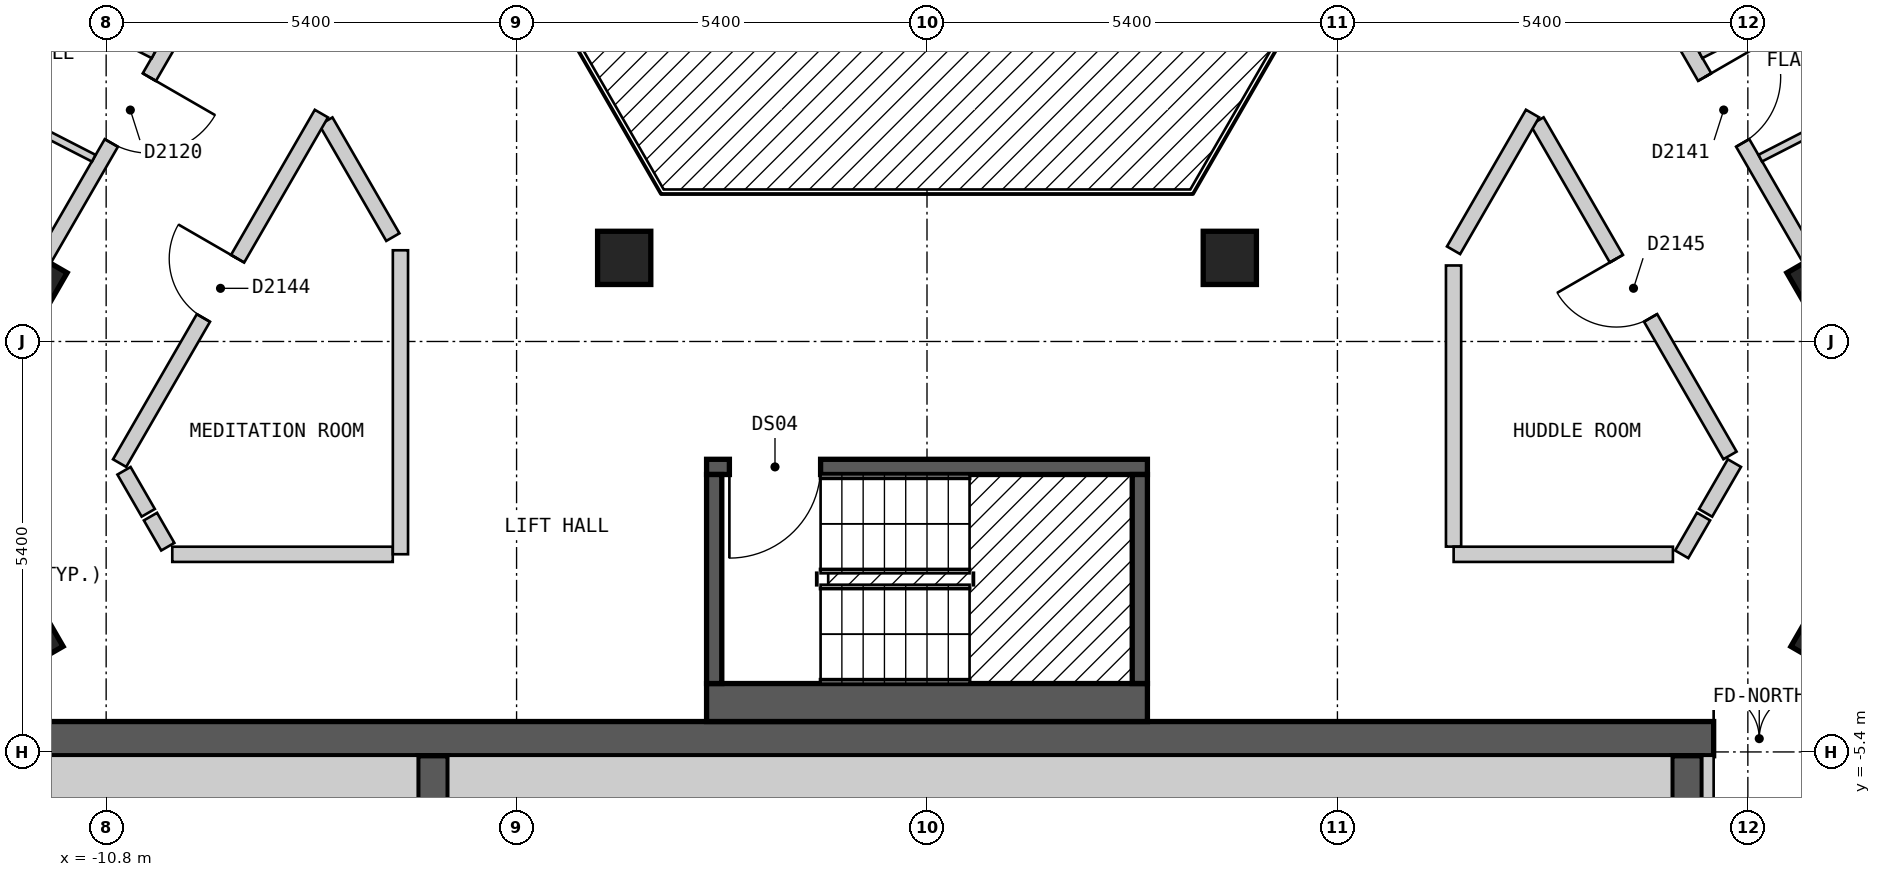
"""IFC4 building model, lengths in metres.
Left out: names, types, materials, properties, quantities, classifications, styles, units other than length and angle.
Written with IfcOpenShell. Run it as: python <this file> out.ifc"""

import sys

from ifc_helpers import new_model, si_unit, direction, frame, frame_2d, origin, origin_2d, place, context, subcontext, project, spatial, rectangle, extrude, element, fill, save


model = new_model("IFC4")
c1 = context("Model", 3, precision=1e-05, world=origin(), true_north=direction((0.0, 1.0)))
c2 = subcontext(c1, "Body", "Model", "MODEL_VIEW")
j1 = project(units=[si_unit("LENGTHUNIT", "METRE"), si_unit("PLANEANGLEUNIT", "RADIAN")], contexts=[c1])
p1 = place(None, origin())
s1 = spatial("IfcSite", under=j1, at=p1, CompositionType="ELEMENT")
p2 = place(p1, origin())
s2 = spatial("IfcBuilding", under=s1, at=p2, CompositionType="ELEMENT")
p3 = place(p2, frame((0.0, 0.0, 211.8)))
s3 = spatial("IfcBuildingStorey", under=s2, at=p3, CompositionType="ELEMENT", Elevation=211.8)
for number, where, z_axis, x_axis in (
    (1, (-11.845, -3.883, 0.0), (0.0, 0.0, 1.0), (0.5, -0.866, 0.0)),
    (2, (11.845, -3.884, 0.0), (0.0, 0.0, 1.0), (0.5, 0.866, 0.0)),
    (3, (11.792, 0.775, 0.0), (0.0, 0.0, 1.0), (-0.5, 0.866, 0.0)),
    (4, (3.984, 1.1, 0.0), (0.0, 0.0, 1.0), (1.0, 0.0, 0.0)),
    (5, (-3.984, 1.1, 0.0), (0.0, 0.0, 1.0), (1.0, 0.0, 0.0)),
    (6, (-11.792, 0.775, 0.0), (0.0, 0.0, 1.0), (-0.5, -0.866, 0.0)),
):
    element("IfcColumn", number, at=place(p3, frame(where, z_axis=z_axis, x_axis=x_axis)), inside=s3, PredefinedType="COLUMN", context=c2, shape_type="SweptSolid", body=[
        extrude(rectangle(XDim=0.7, YDim=0.7, at=origin_2d()), origin(), (0.0, 0.0, 1.0), 3.0),
    ])
p4 = place(p3, frame((-13.3, -5.225, 0.0), z_axis=(0.0, 0.0, 1.0), x_axis=(1.0, 0.0, 0.0)))
e7 = element("IfcWall", 7, at=p4, inside=s3, PredefinedType="SHEAR", context=c2, shape_type="SweptSolid", body=[
    extrude(rectangle(XDim=26.6, YDim=0.45, at=frame_2d((13.3, 0.0))), origin(), (0.0, 0.0, 1.0), 2.7),
])
p5 = place(p4, frame((23.65, 0.0, 0.0)))
e8 = element("IfcOpeningElement", 8, at=p5, cuts=e7, PredefinedType="OPENING", context=c2, shape_type="SweptSolid", body=[
    extrude(rectangle(XDim=1.2, YDim=2.1, at=frame_2d((0.6, 1.05))), frame((0.0, 0.235, 0.0), z_axis=(0.0, -1.0, 0.0), x_axis=(1.0, 0.0, 0.0)), (0.0, 0.0, 1.0), 0.47),
])
for number, where, z_axis, x_axis in (
    (9, (-6.5, -9.15, 0.0), (0.0, 0.0, 1.0), (0.0, 1.0, 0.0)),
    (10, (10.0, -9.15, 0.0), (0.0, 0.0, 1.0), (0.0, 1.0, 0.0)),
):
    element("IfcWall", number, at=place(p3, frame(where, z_axis=z_axis, x_axis=x_axis)), inside=s3, PredefinedType="SHEAR", context=c2, shape_type="SweptSolid", body=[
        extrude(rectangle(XDim=3.7, YDim=0.4, at=frame_2d((1.85, 0.0))), origin(), (0.0, 0.0, 1.0), 2.7),
    ])
p6 = place(p3, frame((-2.9, -4.75, 0.0), z_axis=(0.0, 0.0, 1.0), x_axis=(1.0, 0.0, 0.0)))
e11 = element("IfcWall", 11, at=p6, inside=s3, PredefinedType="SOLIDWALL", context=c2, shape_type="SweptSolid", body=[
    extrude(rectangle(XDim=5.8, YDim=0.5, at=frame_2d((2.9, 0.0))), origin(), (0.0, 0.0, 1.0), 2.7),
])
p7 = place(p3, frame((-2.9, -1.65, 0.0), z_axis=(0.0, 0.0, 1.0), x_axis=(1.0, 0.0, 0.0)))
e12 = element("IfcWall", 12, at=p7, inside=s3, PredefinedType="SOLIDWALL", context=c2, shape_type="SweptSolid", body=[
    extrude(rectangle(XDim=5.8, YDim=0.2, at=frame_2d((2.9, 0.0))), origin(), (0.0, 0.0, 1.0), 2.7),
])
p8 = place(p7, frame((0.3, 0.0, 0.0)))
e13 = element("IfcOpeningElement", 13, at=p8, cuts=e12, PredefinedType="OPENING", context=c2, shape_type="SweptSolid", body=[
    extrude(rectangle(XDim=1.2, YDim=2.1, at=frame_2d((0.6, 1.05))), frame((0.0, 0.11, 0.0), z_axis=(0.0, -1.0, 0.0), x_axis=(1.0, 0.0, 0.0)), (0.0, 0.0, 1.0), 0.22),
])
for number, where, z_axis, x_axis in (
    (14, (-2.8, -4.5, 0.0), (0.0, 0.0, 1.0), (0.0, 1.0, 0.0)),
    (15, (2.8, -4.5, 0.0), (0.0, 0.0, 1.0), (0.0, 1.0, 0.0)),
):
    element("IfcWall", number, at=place(p3, frame(where, z_axis=z_axis, x_axis=x_axis)), inside=s3, PredefinedType="SOLIDWALL", context=c2, shape_type="SweptSolid", body=[
        extrude(rectangle(XDim=2.75, YDim=0.2, at=frame_2d((1.375, 0.0))), origin(), (0.0, 0.0, 1.0), 2.7),
    ])
p9 = place(p3, frame((-7.909, 2.898, 0.0), z_axis=(0.0, 0.0, 1.0), x_axis=(0.50019444547, -0.865913111531, 0.0)))
e16 = element("IfcWall", 16, at=p9, inside=s3, PredefinedType="PARTITIONING", context=c2, shape_type="SweptSolid", body=[
    extrude(rectangle(XDim=1.761, YDim=0.2, at=frame_2d((0.88, 0.0))), origin(), (0.0, 0.0, 1.0), 2.7),
])
p10 = place(p3, frame((-10.565, -1.701, 0.0), z_axis=(0.0, 0.0, 1.0), x_axis=(0.499512735409, -0.866306543416, 0.0)))
e17 = element("IfcWall", 17, at=p10, inside=s3, PredefinedType="PARTITIONING", context=c2, shape_type="SweptSolid", body=[
    extrude(rectangle(XDim=0.638, YDim=0.2, at=frame_2d((0.319, 0.0))), origin(), (0.0, 0.0, 1.0), 2.7),
])
p11 = place(p3, frame((-10.217, -2.304, 0.0), z_axis=(0.0, 0.0, 1.0), x_axis=(0.499013081552, -0.866594452117, 0.0)))
e18 = element("IfcWall", 18, at=p11, inside=s3, PredefinedType="PARTITIONING", context=c2, shape_type="SweptSolid", body=[
    extrude(rectangle(XDim=0.457, YDim=0.2, at=frame_2d((0.229, 0.0))), origin(), (0.0, 0.0, 1.0), 2.7),
])
p12 = place(p3, frame((8.026, 2.899, 0.0), z_axis=(0.0, 0.0, 1.0), x_axis=(0.499986018985, -0.866033475577, 0.0)))
e19 = element("IfcWall", 19, at=p12, inside=s3, PredefinedType="PARTITIONING", context=c2, shape_type="SweptSolid", body=[
    extrude(rectangle(XDim=5.078, YDim=0.2, at=frame_2d((2.539, 0.0))), origin(), (0.0, 0.0, 1.0), 2.7),
])
p13 = place(p12, frame((2.089, 0.0, 0.0)))
e20 = element("IfcOpeningElement", 20, at=p13, cuts=e19, PredefinedType="OPENING", context=c2, shape_type="SweptSolid", body=[
    extrude(rectangle(XDim=0.9, YDim=2.1, at=frame_2d((0.45, 1.05))), frame((0.0, 0.11, 0.0), z_axis=(0.0, -1.0, 0.0), x_axis=(1.0, 0.0, 0.0)), (0.0, 0.0, 1.0), 0.22),
])
p14 = place(p3, frame((9.238, 5.2, 0.0), z_axis=(0.0, 0.0, 1.0), x_axis=(0.500025705601, -0.86601056214, 0.0)))
e21 = element("IfcWall", 21, at=p14, inside=s3, PredefinedType="PARTITIONING", context=c2, shape_type="SweptSolid", body=[
    extrude(rectangle(XDim=7.735, YDim=0.2, at=frame_2d((3.868, 0.0))), origin(), (0.0, 0.0, 1.0), 2.7),
])
p15 = place(p14, frame((6.705, 0.0, 0.0)))
e22 = element("IfcOpeningElement", 22, at=p15, cuts=e21, PredefinedType="OPENING", context=c2, shape_type="SweptSolid", body=[
    extrude(rectangle(XDim=1.0, YDim=2.1, at=frame_2d((0.5, 1.05))), frame((0.0, 0.11, 0.0), z_axis=(0.0, -1.0, 0.0), x_axis=(1.0, 0.0, 0.0)), (0.0, 0.0, 1.0), 0.22),
])
p16 = place(p14, frame((1.988, 0.0, 0.0)))
e23 = element("IfcOpeningElement", 23, at=p16, cuts=e21, PredefinedType="OPENING", context=c2, shape_type="SweptSolid", body=[
    extrude(rectangle(XDim=1.0, YDim=2.1, at=frame_2d((0.5, 1.05))), frame((0.0, 0.11, 0.0), z_axis=(0.0, -1.0, 0.0), x_axis=(1.0, 0.0, 0.0)), (0.0, 0.0, 1.0), 0.22),
])
p17 = place(p3, frame((6.928, 1.0, 0.0), z_axis=(0.0, 0.0, 1.0), x_axis=(0.0, -1.0, 0.0)))
e24 = element("IfcWall", 24, at=p17, inside=s3, PredefinedType="PARTITIONING", context=c2, shape_type="SweptSolid", body=[
    extrude(rectangle(XDim=3.699, YDim=0.2, at=frame_2d((1.85, 0.0))), origin(), (0.0, 0.0, 1.0), 2.7),
])
p18 = place(p3, frame((-9.93, -2.8, 0.0), z_axis=(0.0, 0.0, 1.0), x_axis=(1.0, 0.0, 0.0)))
e25 = element("IfcWall", 25, at=p18, inside=s3, PredefinedType="PARTITIONING", context=c2, shape_type="SweptSolid", body=[
    extrude(rectangle(XDim=2.901, YDim=0.2, at=frame_2d((1.45, 0.0))), origin(), (0.0, 0.0, 1.0), 2.7),
])
p19 = place(p3, frame((6.929, -2.8, 0.0), z_axis=(0.0, 0.0, 1.0), x_axis=(1.0, 0.0, 0.0)))
e26 = element("IfcWall", 26, at=p19, inside=s3, PredefinedType="PARTITIONING", context=c2, shape_type="SweptSolid", body=[
    extrude(rectangle(XDim=2.885, YDim=0.2, at=frame_2d((1.442, 0.0))), origin(), (0.0, 0.0, 1.0), 2.7),
])
p20 = place(p3, frame((6.928, 1.2, 0.0), z_axis=(0.0, 0.0, 1.0), x_axis=(0.500132712588, 0.865948768577, 0.0)))
e27 = element("IfcWall", 27, at=p20, inside=s3, PredefinedType="PARTITIONING", context=c2, shape_type="SweptSolid", body=[
    extrude(rectangle(XDim=2.078, YDim=0.2, at=frame_2d((1.039, 0.0))), origin(), (0.0, 0.0, 1.0), 2.7),
])
p21 = place(p3, frame((9.93, -2.8, 0.0), z_axis=(0.0, 0.0, 1.0), x_axis=(0.500164219654, 0.865930570761, 0.0)))
e28 = element("IfcWall", 28, at=p21, inside=s3, PredefinedType="PARTITIONING", context=c2, shape_type="SweptSolid", body=[
    extrude(rectangle(XDim=0.574, YDim=0.2, at=frame_2d((0.287, 0.0))), origin(), (0.0, 0.0, 1.0), 2.7),
])
p22 = place(p3, frame((10.244, -2.255, 0.0), z_axis=(0.0, 0.0, 1.0), x_axis=(0.50109986513, 0.865389464442, 0.0)))
e29 = element("IfcWall", 29, at=p22, inside=s3, PredefinedType="PARTITIONING", context=c2, shape_type="SweptSolid", body=[
    extrude(rectangle(XDim=0.757, YDim=0.2, at=frame_2d((0.378, 0.0))), origin(), (0.0, 0.0, 1.0), 2.7),
])
p23 = place(p3, frame((-10.623, -1.6, 0.0), z_axis=(0.0, 0.0, 1.0), x_axis=(0.500040865889, 0.866001808567, 0.0)))
e30 = element("IfcWall", 30, at=p23, inside=s3, PredefinedType="PARTITIONING", context=c2, shape_type="SweptSolid", body=[
    extrude(rectangle(XDim=5.31, YDim=0.2, at=frame_2d((2.655, 0.0))), origin(), (0.0, 0.0, 1.0), 2.7),
])
p24 = place(p23, frame((2.205, 0.0, 0.0)))
e31 = element("IfcOpeningElement", 31, at=p24, cuts=e30, PredefinedType="OPENING", context=c2, shape_type="SweptSolid", body=[
    extrude(rectangle(XDim=0.9, YDim=2.1, at=frame_2d((0.45, 1.05))), frame((0.0, 0.11, 0.0), z_axis=(0.0, -1.0, 0.0), x_axis=(1.0, 0.0, 0.0)), (0.0, 0.0, 1.0), 0.22),
])
p25 = place(p3, frame((-13.106, -1.5, 0.0), z_axis=(0.0, 0.0, 1.0), x_axis=(0.500025705601, 0.86601056214, 0.0)))
e32 = element("IfcWall", 32, at=p25, inside=s3, PredefinedType="PARTITIONING", context=c2, shape_type="SweptSolid", body=[
    extrude(rectangle(XDim=7.735, YDim=0.2, at=frame_2d((3.868, 0.0))), origin(), (0.0, 0.0, 1.0), 2.7),
])
p26 = place(p25, frame((4.748, 0.0, 0.0)))
e33 = element("IfcOpeningElement", 33, at=p26, cuts=e32, PredefinedType="OPENING", context=c2, shape_type="SweptSolid", body=[
    extrude(rectangle(XDim=1.0, YDim=2.1, at=frame_2d((0.5, 1.05))), frame((0.0, 0.11, 0.0), z_axis=(0.0, -1.0, 0.0), x_axis=(1.0, 0.0, 0.0)), (0.0, 0.0, 1.0), 0.22),
])
p27 = place(p3, frame((-6.928, -2.799, 0.0), z_axis=(0.0, 0.0, 1.0), x_axis=(0.0, 1.0, 0.0)))
e34 = element("IfcWall", 34, at=p27, inside=s3, PredefinedType="PARTITIONING", context=c2, shape_type="SweptSolid", body=[
    extrude(rectangle(XDim=3.999, YDim=0.2, at=frame_2d((2.0, 0.0))), origin(), (0.0, 0.0, 1.0), 2.7),
])
p28 = place(p3, frame((-12.917, 5.177, 0.0), z_axis=(0.0, 0.0, 1.0), x_axis=(0.889829844516, -0.456292502467, 0.0)))
e35 = element("IfcWall", 35, at=p28, inside=s3, PredefinedType="PARTITIONING", context=c2, shape_type="SweptSolid", body=[
    extrude(rectangle(XDim=3.079, YDim=0.1, at=frame_2d((1.54, 0.0))), origin(), (0.0, 0.0, 1.0), 2.7),
])
p29 = place(p28, frame((1.114, 0.0, 0.0)))
e36 = element("IfcOpeningElement", 36, at=p29, cuts=e35, PredefinedType="OPENING", context=c2, shape_type="SweptSolid", body=[
    extrude(rectangle(XDim=0.9, YDim=2.1, at=frame_2d((0.45, 1.05))), frame((0.0, 0.06, 0.0), z_axis=(0.0, -1.0, 0.0), x_axis=(1.0, 0.0, 0.0)), (0.0, 0.0, 1.0), 0.12),
])
p30 = place(p3, frame((-13.634, 3.78, 0.0), z_axis=(0.0, 0.0, 1.0), x_axis=(0.889908901513, -0.456138298116, 0.0)))
e37 = element("IfcWall", 37, at=p30, inside=s3, PredefinedType="PARTITIONING", context=c2, shape_type="SweptSolid", body=[
    extrude(rectangle(XDim=3.002, YDim=0.1, at=frame_2d((1.501, 0.0))), origin(), (0.0, 0.0, 1.0), 2.7),
])
p31 = place(p30, frame((1.126, 0.0, 0.0)))
e38 = element("IfcOpeningElement", 38, at=p31, cuts=e37, PredefinedType="OPENING", context=c2, shape_type="SweptSolid", body=[
    extrude(rectangle(XDim=0.8, YDim=2.1, at=frame_2d((0.4, 1.05))), frame((0.0, 0.06, 0.0), z_axis=(0.0, -1.0, 0.0), x_axis=(1.0, 0.0, 0.0)), (0.0, 0.0, 1.0), 0.12),
])
p32 = place(p3, frame((10.178, 3.772, 0.0), z_axis=(0.0, 0.0, 1.0), x_axis=(0.889732071959, 0.456483121405, 0.0)))
e39 = element("IfcWall", 39, at=p32, inside=s3, PredefinedType="PARTITIONING", context=c2, shape_type="SweptSolid", body=[
    extrude(rectangle(XDim=2.679, YDim=0.1, at=frame_2d((1.34, 0.0))), origin(), (0.0, 0.0, 1.0), 2.7),
])
p33 = place(p32, frame((0.915, 0.0, 0.0)))
e40 = element("IfcOpeningElement", 40, at=p33, cuts=e39, PredefinedType="OPENING", context=c2, shape_type="SweptSolid", body=[
    extrude(rectangle(XDim=0.8, YDim=2.1, at=frame_2d((0.4, 1.05))), frame((0.0, 0.06, 0.0), z_axis=(0.0, -1.0, 0.0), x_axis=(1.0, 0.0, 0.0)), (0.0, 0.0, 1.0), 0.12),
])
p34 = place(p3, frame((10.963, 2.412, 0.0), z_axis=(0.0, 0.0, 1.0), x_axis=(0.889943997558, 0.456069820543, 0.0)))
e41 = element("IfcWall", 41, at=p34, inside=s3, PredefinedType="PARTITIONING", context=c2, shape_type="SweptSolid", body=[
    extrude(rectangle(XDim=2.651, YDim=0.1, at=frame_2d((1.325, 0.0))), origin(), (0.0, 0.0, 1.0), 2.7),
])
p35 = place(p34, frame((0.826, 0.0, 0.0)))
e42 = element("IfcOpeningElement", 42, at=p35, cuts=e41, PredefinedType="OPENING", context=c2, shape_type="SweptSolid", body=[
    extrude(rectangle(XDim=0.9, YDim=2.1, at=frame_2d((0.45, 1.05))), frame((0.0, 0.06, 0.0), z_axis=(0.0, -1.0, 0.0), x_axis=(1.0, 0.0, 0.0)), (0.0, 0.0, 1.0), 0.12),
])
p36 = place(p3, frame((-12.1, -5.825, 0.0), z_axis=(0.0, 0.0, 1.0), x_axis=(1.0, 0.0, 0.0)))
e43 = element("IfcWall", 43, at=p36, inside=s3, PredefinedType="SOLIDWALL", context=c2, shape_type="SweptSolid", body=[
    extrude(rectangle(XDim=5.4, YDim=0.75, at=frame_2d((2.7, 0.0))), origin(), (0.0, 0.0, 1.0), 2.7),
])
p37 = place(p3, frame((-6.3, -5.825, 0.0), z_axis=(0.0, 0.0, 1.0), x_axis=(1.0, 0.0, 0.0)))
e44 = element("IfcWall", 44, at=p37, inside=s3, PredefinedType="SOLIDWALL", context=c2, shape_type="SweptSolid", body=[
    extrude(rectangle(XDim=16.1, YDim=0.75, at=frame_2d((8.05, 0.0))), origin(), (0.0, 0.0, 1.0), 2.7),
])
p38 = place(p3, frame((10.275, -6.2, 0.0), z_axis=(0.0, 0.0, 1.0), x_axis=(0.0, 1.0, 0.0)))
e45 = element("IfcWall", 45, at=p38, inside=s3, PredefinedType="PARTITIONING", context=c2, shape_type="SweptSolid", body=[
    extrude(rectangle(XDim=0.75, YDim=0.15, at=frame_2d((0.375, 0.0))), origin(), (0.0, 0.0, 1.0), 2.7),
])
p39 = place(p8, origin())
e46 = element("IfcDoor", 46, at=p39, inside=s3, OperationType="SINGLE_SWING_LEFT", PredefinedType="DOOR", context=c2, shape_type="SweptSolid", body=[
    extrude(rectangle(XDim=1.2, YDim=2.1, at=frame_2d((0.6, 1.05))), frame((0.0, 0.025, 0.0), z_axis=(0.0, -1.0, 0.0), x_axis=(1.0, 0.0, 0.0)), (0.0, 0.0, 1.0), 0.05),
])
fill(e13, e46)
p40 = place(p26, origin())
e47 = element("IfcDoor", 47, at=p40, inside=s3, OperationType="SINGLE_SWING_RIGHT", PredefinedType="DOOR", context=c2, shape_type="SweptSolid", body=[
    extrude(rectangle(XDim=1.0, YDim=2.1, at=frame_2d((0.5, 1.05))), frame((0.0, 0.025, 0.0), z_axis=(0.0, -1.0, 0.0), x_axis=(1.0, 0.0, 0.0)), (0.0, 0.0, 1.0), 0.05),
])
fill(e33, e47)
p41 = place(p16, origin())
e48 = element("IfcDoor", 48, at=p41, inside=s3, OperationType="SINGLE_SWING_LEFT", PredefinedType="DOOR", context=c2, shape_type="SweptSolid", body=[
    extrude(rectangle(XDim=1.0, YDim=2.1, at=frame_2d((0.5, 1.05))), frame((0.0, 0.025, 0.0), z_axis=(0.0, -1.0, 0.0), x_axis=(1.0, 0.0, 0.0)), (0.0, 0.0, 1.0), 0.05),
])
fill(e23, e48)
p42 = place(p24, origin())
e49 = element("IfcDoor", 49, at=p42, inside=s3, OperationType="SINGLE_SWING_RIGHT", PredefinedType="DOOR", context=c2, shape_type="SweptSolid", body=[
    extrude(rectangle(XDim=0.9, YDim=2.1, at=frame_2d((0.45, 1.05))), frame((0.0, 0.025, 0.0), z_axis=(0.0, -1.0, 0.0), x_axis=(1.0, 0.0, 0.0)), (0.0, 0.0, 1.0), 0.05),
])
fill(e31, e49)
p43 = place(p13, origin())
e50 = element("IfcDoor", 50, at=p43, inside=s3, OperationType="SINGLE_SWING_LEFT", PredefinedType="DOOR", context=c2, shape_type="SweptSolid", body=[
    extrude(rectangle(XDim=0.9, YDim=2.1, at=frame_2d((0.45, 1.05))), frame((0.0, 0.025, 0.0), z_axis=(0.0, -1.0, 0.0), x_axis=(1.0, 0.0, 0.0)), (0.0, 0.0, 1.0), 0.05),
])
fill(e20, e50)
p44 = place(p5, origin())
e51 = element("IfcDoor", 51, at=p44, inside=s3, OperationType="DOUBLE_DOOR_SINGLE_SWING", PredefinedType="DOOR", context=c2, shape_type="SweptSolid", body=[
    extrude(rectangle(XDim=1.2, YDim=2.1, at=frame_2d((0.6, 1.05))), frame((0.0, 0.025, 0.0), z_axis=(0.0, -1.0, 0.0), x_axis=(1.0, 0.0, 0.0)), (0.0, 0.0, 1.0), 0.05),
])
fill(e8, e51)
save(model, sys.argv[1])
